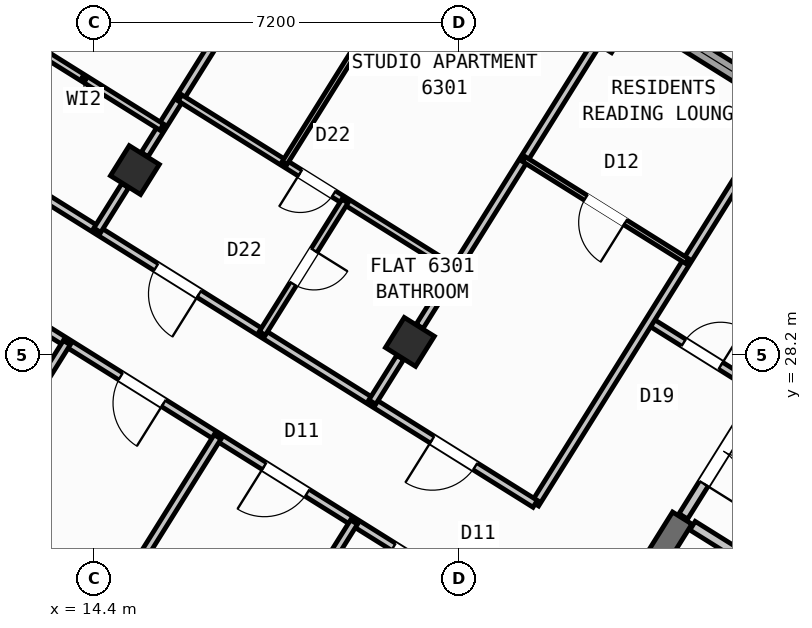
"""IFC4 building model, lengths in metres.
Left out: names, types, materials, properties, quantities, classifications, styles, units other than length and angle.
Written with IfcOpenShell. Run it as: python <this file> out.ifc"""

import sys

from ifc_helpers import new_model, si_unit, direction, frame, frame_2d, origin, origin_2d, place, context, subcontext, project, spatial, rectangle, hollow_rectangle, extrude, source, transform, mapped, element, fill, save


model = new_model("IFC4")
c1 = context("Model", 3, precision=1e-05, world=origin(), true_north=direction((0.0, 1.0)))
c2 = subcontext(c1, "Body", "Model", "MODEL_VIEW")
j1 = project(units=[si_unit("LENGTHUNIT", "METRE"), si_unit("PLANEANGLEUNIT", "RADIAN")], contexts=[c1])
p1 = place(None, origin())
s1 = spatial("IfcSite", under=j1, at=p1, CompositionType="ELEMENT")
p2 = place(p1, origin())
s2 = spatial("IfcBuilding", under=s1, at=p2, CompositionType="ELEMENT")
p3 = place(p2, frame((0.0, 0.0, 251.1)))
s3 = spatial("IfcBuildingStorey", under=s2, at=p3, CompositionType="ELEMENT", Elevation=251.1)
p4 = place(p3, frame((26.007, 24.976, 0.0), z_axis=(0.0, 0.0, 1.0), x_axis=(-0.529931155655, -0.848040665456, 0.0)))
e1 = element("IfcWall", 1, at=p4, inside=s3, PredefinedType="SHEAR", context=c2, shape_type="SweptSolid", body=[
    extrude(rectangle(XDim=6.475, YDim=0.45, at=frame_2d((3.238, 0.0))), origin(), (0.0, 0.0, 1.0), 3.32),
])
m1 = source(origin(), c2, "Body", "SweptSolid", [
    extrude(hollow_rectangle(XDim=0.7, YDim=0.7, WallThickness=0.028, at=origin_2d()), origin(), (0.0, 0.0, 1.0), 3.6),
])
for number, where, z_axis, x_axis in (
    (2, (24.5, 34.643, 0.0), (0.0, 0.0, 1.0), (-0.848, 0.53, 0.0)),
    (3, (20.632, 28.452, 0.0), (0.0, 0.0, 1.0), (-0.848, 0.53, 0.0)),
    (4, (15.205, 31.844, 0.0), (0.0, 0.0, 1.0), (-0.848, 0.53, 0.0)),
):
    element("IfcColumn", number, at=place(p3, frame(where, z_axis=z_axis, x_axis=x_axis)), inside=s3, PredefinedType="COLUMN", context=c2, shape_type="MappedRepresentation", body=[
        mapped(m1, transform((0.0, 0.0, 0.0), scale=1.0)),
    ])
p5 = place(p3, frame((2.415, 23.452, 0.0), z_axis=(0.0, 0.0, 1.0), x_axis=(0.52991049553, 0.848053575387, 0.0)))
e5 = element("IfcWall", 5, at=p5, inside=s3, PredefinedType="STANDARD", context=c2, shape_type="SweptSolid", body=[
    extrude(rectangle(XDim=21.587, YDim=0.32, at=frame_2d((10.794, 0.0))), origin(), (0.0, 0.0, 1.0), 2.845),
])
p6 = place(p5, frame((3.119, 0.0, 0.9)))
e6 = element("IfcOpeningElement", 6, at=p6, cuts=e5, PredefinedType="OPENING", context=c2, shape_type="SweptSolid", body=[
    extrude(rectangle(XDim=1.65, YDim=1.45, at=frame_2d((0.825, 0.725))), frame((0.0, 0.17, 0.0), z_axis=(0.0, -1.0, 0.0), x_axis=(1.0, 0.0, 0.0)), (0.0, 0.0, 1.0), 0.34),
])
p7 = place(p5, frame((7.854, 0.0, 0.9)))
e7 = element("IfcOpeningElement", 7, at=p7, cuts=e5, PredefinedType="OPENING", context=c2, shape_type="SweptSolid", body=[
    extrude(rectangle(XDim=1.35, YDim=1.45, at=frame_2d((0.675, 0.725))), frame((0.0, 0.17, 0.0), z_axis=(0.0, -1.0, 0.0), x_axis=(1.0, 0.0, 0.0)), (0.0, 0.0, 1.0), 0.34),
])
p8 = place(p5, frame((16.979, 0.0, 0.95)))
e8 = element("IfcOpeningElement", 8, at=p8, cuts=e5, PredefinedType="OPENING", context=c2, shape_type="SweptSolid", body=[
    extrude(rectangle(XDim=1.95, YDim=1.35, at=frame_2d((0.975, 0.675))), frame((0.0, 0.17, 0.0), z_axis=(0.0, -1.0, 0.0), x_axis=(1.0, 0.0, 0.0)), (0.0, 0.0, 1.0), 0.34),
])
p9 = place(p3, frame((14.138, 41.825, 0.0), z_axis=(0.0, 0.0, 1.0), x_axis=(0.848046498049, -0.529921821731, 0.0)))
e9 = element("IfcWall", 9, at=p9, inside=s3, PredefinedType="STANDARD", context=c2, shape_type="SweptSolid", body=[
    extrude(rectangle(XDim=31.588, YDim=0.32, at=frame_2d((15.794, 0.0))), origin(), (0.0, 0.0, 1.0), 3.32),
])
p10 = place(p9, frame((3.46, 0.0, 0.0)))
e10 = element("IfcOpeningElement", 10, at=p10, cuts=e9, PredefinedType="OPENING", context=c2, shape_type="SweptSolid", body=[
    extrude(rectangle(XDim=1.05, YDim=2.15, at=frame_2d((0.525, 1.075))), frame((0.0, 0.17, 0.0), z_axis=(0.0, -1.0, 0.0), x_axis=(1.0, 0.0, 0.0)), (0.0, 0.0, 1.0), 0.34),
])
p11 = place(p9, frame((0.831, 0.0, 1.0)))
e11 = element("IfcOpeningElement", 11, at=p11, cuts=e9, PredefinedType="OPENING", context=c2, shape_type="SweptSolid", body=[
    extrude(rectangle(XDim=0.9, YDim=1.25, at=frame_2d((0.45, 0.625))), frame((0.0, 0.17, 0.0), z_axis=(0.0, -1.0, 0.0), x_axis=(1.0, 0.0, 0.0)), (0.0, 0.0, 1.0), 0.34),
])
p12 = place(p9, frame((9.837, 0.0, 0.9)))
e12 = element("IfcOpeningElement", 12, at=p12, cuts=e9, PredefinedType="OPENING", context=c2, shape_type="SweptSolid", body=[
    extrude(rectangle(XDim=1.35, YDim=1.45, at=frame_2d((0.675, 0.725))), frame((0.0, 0.17, 0.0), z_axis=(0.0, -1.0, 0.0), x_axis=(1.0, 0.0, 0.0)), (0.0, 0.0, 1.0), 0.34),
])
p13 = place(p9, frame((13.599, 0.0, 0.95)))
e13 = element("IfcOpeningElement", 13, at=p13, cuts=e9, PredefinedType="OPENING", context=c2, shape_type="SweptSolid", body=[
    extrude(rectangle(XDim=1.95, YDim=1.35, at=frame_2d((0.975, 0.675))), frame((0.0, 0.17, 0.0), z_axis=(0.0, -1.0, 0.0), x_axis=(1.0, 0.0, 0.0)), (0.0, 0.0, 1.0), 0.34),
])
p14 = place(p9, frame((17.154, 0.0, 1.0)))
e14 = element("IfcOpeningElement", 14, at=p14, cuts=e9, PredefinedType="OPENING", context=c2, shape_type="SweptSolid", body=[
    extrude(rectangle(XDim=0.9, YDim=1.25, at=frame_2d((0.45, 0.625))), frame((0.0, 0.17, 0.0), z_axis=(0.0, -1.0, 0.0), x_axis=(1.0, 0.0, 0.0)), (0.0, 0.0, 1.0), 0.34),
])
p15 = place(p9, frame((21.651, 0.0, 0.9)))
e15 = element("IfcOpeningElement", 15, at=p15, cuts=e9, PredefinedType="OPENING", context=c2, shape_type="SweptSolid", body=[
    extrude(rectangle(XDim=1.65, YDim=1.45, at=frame_2d((0.825, 0.725))), frame((0.0, 0.17, 0.0), z_axis=(0.0, -1.0, 0.0), x_axis=(1.0, 0.0, 0.0)), (0.0, 0.0, 1.0), 0.34),
])
p16 = place(p9, frame((27.215, 0.0, 0.9)))
e16 = element("IfcOpeningElement", 16, at=p16, cuts=e9, PredefinedType="OPENING", context=c2, shape_type="SweptSolid", body=[
    extrude(rectangle(XDim=1.65, YDim=1.45, at=frame_2d((0.825, 0.725))), frame((0.0, 0.17, 0.0), z_axis=(0.0, -1.0, 0.0), x_axis=(1.0, 0.0, 0.0)), (0.0, 0.0, 1.0), 0.34),
])
p17 = place(p3, frame((31.525, 21.504, 0.0), z_axis=(0.0, 0.0, 1.0), x_axis=(-0.848042066329, 0.529928913853, 0.0)))
e17 = element("IfcWall", 17, at=p17, inside=s3, PredefinedType="STANDARD", context=c2, shape_type="SweptSolid", body=[
    extrude(rectangle(XDim=6.268, YDim=0.2, at=frame_2d((3.134, 0.0))), origin(), (0.0, 0.0, 1.0), 3.31),
])
p18 = place(p17, frame((4.4, 0.0, 0.0)))
e18 = element("IfcOpeningElement", 18, at=p18, cuts=e17, PredefinedType="OPENING", context=c2, shape_type="SweptSolid", body=[
    extrude(rectangle(XDim=0.86, YDim=2.05, at=frame_2d((0.43, 1.025))), frame((0.0, 0.11, 0.0), z_axis=(0.0, -1.0, 0.0), x_axis=(1.0, 0.0, 0.0)), (0.0, 0.0, 1.0), 0.22),
])
p19 = place(p17, frame((1.45, 0.0, 0.0)))
e19 = element("IfcOpeningElement", 19, at=p19, cuts=e17, PredefinedType="OPENING", context=c2, shape_type="SweptSolid", body=[
    extrude(rectangle(XDim=0.86, YDim=2.05, at=frame_2d((0.43, 1.025))), frame((0.0, 0.11, 0.0), z_axis=(0.0, -1.0, 0.0), x_axis=(1.0, 0.0, 0.0)), (0.0, 0.0, 1.0), 0.22),
])
p20 = place(p3, frame((27.596, 27.52, 0.0), z_axis=(0.0, 0.0, 1.0), x_axis=(-0.529865479138, -0.848081702443, 0.0)))
e20 = element("IfcWall", 20, at=p20, inside=s3, PredefinedType="STANDARD", context=c2, shape_type="SweptSolid", body=[
    extrude(rectangle(XDim=2.96, YDim=0.2, at=frame_2d((1.48, 0.0))), origin(), (0.0, 0.0, 1.0), 3.31),
])
p21 = place(p20, frame((0.7, 0.0, 0.0)))
e21 = element("IfcOpeningElement", 21, at=p21, cuts=e20, PredefinedType="OPENING", context=c2, shape_type="SweptSolid", body=[
    extrude(rectangle(XDim=1.5, YDim=2.15, at=frame_2d((0.75, 1.075))), frame((0.0, 0.11, 0.0), z_axis=(0.0, -1.0, 0.0), x_axis=(1.0, 0.0, 0.0)), (0.0, 0.0, 1.0), 0.22),
])
p22 = place(p3, frame((27.57, 27.478, 0.0), z_axis=(0.0, 0.0, 1.0), x_axis=(-0.848050851465, 0.529914854792, 0.0)))
e22 = element("IfcWall", 22, at=p22, inside=s3, PredefinedType="PARTITIONING", context=c2, shape_type="SweptSolid", body=[
    extrude(rectangle(XDim=2.61, YDim=0.16, at=frame_2d((1.305, 0.0))), origin(), (0.0, 0.0, 1.0), 3.31),
])
p23 = place(p22, frame((0.95, 0.0, 0.0)))
e23 = element("IfcOpeningElement", 23, at=p23, cuts=e22, PredefinedType="OPENING", context=c2, shape_type="SweptSolid", body=[
    extrude(rectangle(XDim=0.86, YDim=2.05, at=frame_2d((0.43, 1.025))), frame((0.0, 0.09, 0.0), z_axis=(0.0, -1.0, 0.0), x_axis=(1.0, 0.0, 0.0)), (0.0, 0.0, 1.0), 0.18),
])
p24 = place(p3, frame((27.953, 33.016, 0.0), z_axis=(0.0, 0.0, 1.0), x_axis=(-0.529903001606, -0.848058257957, 0.0)))
e24 = element("IfcWall", 24, at=p24, inside=s3, PredefinedType="PARTITIONING", context=c2, shape_type="SweptSolid", body=[
    extrude(rectangle(XDim=9.15, YDim=0.16, at=frame_2d((4.575, 0.0))), origin(), (0.0, 0.0, 1.0), 3.31),
])
p25 = place(p3, frame((23.104, 25.256, 0.0), z_axis=(0.0, 0.0, 1.0), x_axis=(-0.848041752158, 0.529929416617, 0.0)))
e25 = element("IfcWall", 25, at=p25, inside=s3, PredefinedType="PARTITIONING", context=c2, shape_type="SweptSolid", body=[
    extrude(rectangle(XDim=16.73, YDim=0.16, at=frame_2d((8.365, 0.0))), origin(), (0.0, 0.0, 1.0), 3.31),
])
p26 = place(p25, frame((1.395, 0.0, 0.0)))
e26 = element("IfcOpeningElement", 26, at=p26, cuts=e25, PredefinedType="OPENING", context=c2, shape_type="SweptSolid", body=[
    extrude(rectangle(XDim=1.0, YDim=2.1, at=frame_2d((0.5, 1.05))), frame((0.0, 0.09, 0.0), z_axis=(0.0, -1.0, 0.0), x_axis=(1.0, 0.0, 0.0)), (0.0, 0.0, 1.0), 0.18),
])
p27 = place(p25, frame((7.82, 0.0, 0.0)))
e27 = element("IfcOpeningElement", 27, at=p27, cuts=e25, PredefinedType="OPENING", context=c2, shape_type="SweptSolid", body=[
    extrude(rectangle(XDim=1.0, YDim=2.1, at=frame_2d((0.5, 1.05))), frame((0.0, 0.09, 0.0), z_axis=(0.0, -1.0, 0.0), x_axis=(1.0, 0.0, 0.0)), (0.0, 0.0, 1.0), 0.18),
])
p28 = place(p25, frame((14.76, 0.0, 0.0)))
e28 = element("IfcOpeningElement", 28, at=p28, cuts=e25, PredefinedType="OPENING", context=c2, shape_type="SweptSolid", body=[
    extrude(rectangle(XDim=1.0, YDim=2.1, at=frame_2d((0.5, 1.05))), frame((0.0, 0.09, 0.0), z_axis=(0.0, -1.0, 0.0), x_axis=(1.0, 0.0, 0.0)), (0.0, 0.0, 1.0), 0.18),
])
p29 = place(p3, frame((21.938, 23.391, 0.0), z_axis=(0.0, 0.0, 1.0), x_axis=(-0.848045850158, 0.529922858565, 0.0)))
e29 = element("IfcWall", 29, at=p29, inside=s3, PredefinedType="PARTITIONING", context=c2, shape_type="SweptSolid", body=[
    extrude(rectangle(XDim=16.73, YDim=0.16, at=frame_2d((8.365, 0.0))), origin(), (0.0, 0.0, 1.0), 3.31),
])
p30 = place(p29, frame((0.92, 0.0, 0.0)))
e30 = element("IfcOpeningElement", 30, at=p30, cuts=e29, PredefinedType="OPENING", context=c2, shape_type="SweptSolid", body=[
    extrude(rectangle(XDim=1.0, YDim=2.1, at=frame_2d((0.5, 1.05))), frame((0.0, 0.09, 0.0), z_axis=(0.0, -1.0, 0.0), x_axis=(1.0, 0.0, 0.0)), (0.0, 0.0, 1.0), 0.18),
])
p31 = place(p29, frame((3.928, 0.0, 0.0)))
e31 = element("IfcOpeningElement", 31, at=p31, cuts=e29, PredefinedType="OPENING", context=c2, shape_type="SweptSolid", body=[
    extrude(rectangle(XDim=1.0, YDim=2.1, at=frame_2d((0.5, 1.05))), frame((0.0, 0.09, 0.0), z_axis=(0.0, -1.0, 0.0), x_axis=(1.0, 0.0, 0.0)), (0.0, 0.0, 1.0), 0.18),
])
p32 = place(p29, frame((7.271, 0.0, 0.0)))
e32 = element("IfcOpeningElement", 32, at=p32, cuts=e29, PredefinedType="OPENING", context=c2, shape_type="SweptSolid", body=[
    extrude(rectangle(XDim=1.0, YDim=2.1, at=frame_2d((0.5, 1.05))), frame((0.0, 0.09, 0.0), z_axis=(0.0, -1.0, 0.0), x_axis=(1.0, 0.0, 0.0)), (0.0, 0.0, 1.0), 0.18),
])
p33 = place(p29, frame((10.78, 0.0, 0.0)))
e33 = element("IfcOpeningElement", 33, at=p33, cuts=e29, PredefinedType="OPENING", context=c2, shape_type="SweptSolid", body=[
    extrude(rectangle(XDim=1.0, YDim=2.1, at=frame_2d((0.5, 1.05))), frame((0.0, 0.09, 0.0), z_axis=(0.0, -1.0, 0.0), x_axis=(1.0, 0.0, 0.0)), (0.0, 0.0, 1.0), 0.18),
])
p34 = place(p29, frame((14.372, 0.0, 0.0)))
e34 = element("IfcOpeningElement", 34, at=p34, cuts=e29, PredefinedType="OPENING", context=c2, shape_type="SweptSolid", body=[
    extrude(rectangle(XDim=1.0, YDim=2.1, at=frame_2d((0.5, 1.05))), frame((0.0, 0.09, 0.0), z_axis=(0.0, -1.0, 0.0), x_axis=(1.0, 0.0, 0.0)), (0.0, 0.0, 1.0), 0.18),
])
p35 = place(p3, frame((19.529, 24.896, 0.0), z_axis=(0.0, 0.0, 1.0), x_axis=(-0.529914125013, -0.848051307476, 0.0)))
e35 = element("IfcWall", 35, at=p35, inside=s3, PredefinedType="PARTITIONING", context=c2, shape_type="SweptSolid", body=[
    extrude(rectangle(XDim=10.35, YDim=0.16, at=frame_2d((5.175, 0.0))), origin(), (0.0, 0.0, 1.0), 3.31),
])
p36 = place(p3, frame((16.837, 26.579, 0.0), z_axis=(0.0, 0.0, 1.0), x_axis=(-0.529941690036, -0.848034082547, 0.0)))
e36 = element("IfcWall", 36, at=p36, inside=s3, PredefinedType="PARTITIONING", context=c2, shape_type="SweptSolid", body=[
    extrude(rectangle(XDim=10.35, YDim=0.16, at=frame_2d((5.175, 0.0))), origin(), (0.0, 0.0, 1.0), 2.935),
])
p37 = place(p3, frame((13.861, 28.438, 0.0), z_axis=(0.0, 0.0, 1.0), x_axis=(-0.529931089283, -0.848040706931, 0.0)))
e37 = element("IfcWall", 37, at=p37, inside=s3, PredefinedType="PARTITIONING", context=c2, shape_type="SweptSolid", body=[
    extrude(rectangle(XDim=10.35, YDim=0.16, at=frame_2d((5.175, 0.0))), origin(), (0.0, 0.0, 1.0), 3.31),
])
p38 = place(p3, frame((24.309, 34.336, 0.0), z_axis=(0.0, 0.0, 1.0), x_axis=(-0.529895484599, -0.848062954858, 0.0)))
e38 = element("IfcWall", 38, at=p38, inside=s3, PredefinedType="PARTITIONING", context=c2, shape_type="SweptSolid", body=[
    extrude(rectangle(XDim=6.576, YDim=0.16, at=frame_2d((3.288, 0.0))), origin(), (0.0, 0.0, 1.0), 2.845),
])
p39 = place(p3, frame((20.44, 28.145, 0.0), z_axis=(0.0, 0.0, 1.0), x_axis=(-0.529977795385, -0.848011519025, 0.0)))
e39 = element("IfcWall", 39, at=p39, inside=s3, PredefinedType="PARTITIONING", context=c2, shape_type="SweptSolid", body=[
    extrude(rectangle(XDim=1.038, YDim=0.16, at=frame_2d((0.519, 0.0))), origin(), (0.0, 0.0, 1.0), 2.845),
])
p40 = place(p3, frame((26.099, 30.05, 0.0), z_axis=(0.0, 0.0, 1.0), x_axis=(-0.84803087207, 0.529946827537, 0.0)))
e40 = element("IfcWall", 40, at=p40, inside=s3, PredefinedType="PARTITIONING", context=c2, shape_type="SweptSolid", body=[
    extrude(rectangle(XDim=3.79, YDim=0.11, at=frame_2d((1.895, 0.0))), origin(), (0.0, 0.0, 1.0), 3.31),
])
p41 = place(p40, frame((1.435, 0.0, 0.0)))
e41 = element("IfcOpeningElement", 41, at=p41, cuts=e40, PredefinedType="OPENING", context=c2, shape_type="SweptSolid", body=[
    extrude(rectangle(XDim=0.92, YDim=2.08, at=frame_2d((0.46, 1.04))), frame((0.0, 0.065, 0.0), z_axis=(0.0, -1.0, 0.0), x_axis=(1.0, 0.0, 0.0)), (0.0, 0.0, 1.0), 0.13),
])
p42 = place(p3, frame((18.881, 37.727, 0.0), z_axis=(0.0, 0.0, 1.0), x_axis=(-0.529938869374, -0.84803584519, 0.0)))
e42 = element("IfcWall", 42, at=p42, inside=s3, PredefinedType="PARTITIONING", context=c2, shape_type="SweptSolid", body=[
    extrude(rectangle(XDim=6.576, YDim=0.16, at=frame_2d((3.288, 0.0))), origin(), (0.0, 0.0, 1.0), 2.845),
])
p43 = place(p3, frame((15.013, 31.537, 0.0), z_axis=(0.0, 0.0, 1.0), x_axis=(-0.529872092657, -0.848077570405, 0.0)))
e43 = element("IfcWall", 43, at=p43, inside=s3, PredefinedType="PARTITIONING", context=c2, shape_type="SweptSolid", body=[
    extrude(rectangle(XDim=1.038, YDim=0.16, at=frame_2d((0.519, 0.0))), origin(), (0.0, 0.0, 1.0), 2.845),
])
p44 = place(p3, frame((21.522, 29.877, 0.0), z_axis=(0.0, 0.0, 1.0), x_axis=(-0.848039019877, 0.529933789039, 0.0)))
e44 = element("IfcWall", 44, at=p44, inside=s3, PredefinedType="PLUMBINGWALL", context=c2, shape_type="SweptSolid", body=[
    extrude(rectangle(XDim=6.4, YDim=0.14, at=frame_2d((3.2, 0.0))), origin(), (0.0, 0.0, 1.0), 3.31),
])
p45 = place(p44, frame((2.824, 0.0, 0.0)))
e45 = element("IfcOpeningElement", 45, at=p45, cuts=e44, PredefinedType="OPENING", context=c2, shape_type="SweptSolid", body=[
    extrude(rectangle(XDim=0.78, YDim=2.05, at=frame_2d((0.39, 1.025))), frame((0.0, 0.08, 0.0), z_axis=(0.0, -1.0, 0.0), x_axis=(1.0, 0.0, 0.0)), (0.0, 0.0, 1.0), 0.16),
])
p46 = place(p3, frame((19.351, 31.233, 0.0), z_axis=(0.0, 0.0, 1.0), x_axis=(-0.52989206052, -0.848065094316, 0.0)))
e46 = element("IfcWall", 46, at=p46, inside=s3, PredefinedType="PLUMBINGWALL", context=c2, shape_type="SweptSolid", body=[
    extrude(rectangle(XDim=3.08, YDim=0.14, at=frame_2d((1.54, 0.0))), origin(), (0.0, 0.0, 1.0), 3.31),
])
p47 = place(p46, frame((1.15, 0.0, 0.0)))
e47 = element("IfcOpeningElement", 47, at=p47, cuts=e46, PredefinedType="OPENING", context=c2, shape_type="SweptSolid", body=[
    extrude(rectangle(XDim=0.78, YDim=2.05, at=frame_2d((0.39, 1.025))), frame((0.0, 0.08, 0.0), z_axis=(0.0, -1.0, 0.0), x_axis=(1.0, 0.0, 0.0)), (0.0, 0.0, 1.0), 0.16),
])
p48 = place(p3, frame((21.517, 37.356, 0.0), z_axis=(0.0, 0.0, 1.0), x_axis=(-0.529905479715, -0.848056709524, 0.0)))
e48 = element("IfcWall", 48, at=p48, inside=s3, PredefinedType="PARTITIONING", context=c2, shape_type="SweptSolid", body=[
    extrude(rectangle(XDim=6.34, YDim=0.11, at=frame_2d((3.17, 0.0))), origin(), (0.0, 0.0, 1.0), 3.31),
])
p49 = place(p48, frame((0.47, 0.0, 0.0)))
e49 = element("IfcOpeningElement", 49, at=p49, cuts=e48, PredefinedType="OPENING", context=c2, shape_type="SweptSolid", body=[
    extrude(rectangle(XDim=0.92, YDim=2.08, at=frame_2d((0.46, 1.04))), frame((0.0, 0.065, 0.0), z_axis=(0.0, -1.0, 0.0), x_axis=(1.0, 0.0, 0.0)), (0.0, 0.0, 1.0), 0.13),
])
p50 = place(p3, frame((16.385, 40.563, 0.0), z_axis=(0.0, 0.0, 1.0), x_axis=(-0.529931378574, -0.848040526156, 0.0)))
e50 = element("IfcWall", 50, at=p50, inside=s3, PredefinedType="PARTITIONING", context=c2, shape_type="SweptSolid", body=[
    extrude(rectangle(XDim=9.42, YDim=0.11, at=frame_2d((4.71, 0.0))), origin(), (0.0, 0.0, 1.0), 3.31),
])
p51 = place(p50, frame((7.78, 0.0, 0.0)))
e51 = element("IfcOpeningElement", 51, at=p51, cuts=e50, PredefinedType="OPENING", context=c2, shape_type="SweptSolid", body=[
    extrude(rectangle(XDim=0.78, YDim=2.05, at=frame_2d((0.39, 1.025))), frame((0.0, 0.065, 0.0), z_axis=(0.0, -1.0, 0.0), x_axis=(1.0, 0.0, 0.0)), (0.0, 0.0, 1.0), 0.13),
])
p52 = place(p50, frame((3.05, 0.0, 0.0)))
e52 = element("IfcOpeningElement", 52, at=p52, cuts=e50, PredefinedType="OPENING", context=c2, shape_type="SweptSolid", body=[
    extrude(rectangle(XDim=0.92, YDim=2.08, at=frame_2d((0.46, 1.04))), frame((0.0, 0.065, 0.0), z_axis=(0.0, -1.0, 0.0), x_axis=(1.0, 0.0, 0.0)), (0.0, 0.0, 1.0), 0.13),
])
p53 = place(p3, frame((15.734, 32.692, 0.0), z_axis=(0.0, 0.0, 1.0), x_axis=(-0.848051346257, 0.52991406295, 0.0)))
e53 = element("IfcWall", 53, at=p53, inside=s3, PredefinedType="PLUMBINGWALL", context=c2, shape_type="SweptSolid", body=[
    extrude(rectangle(XDim=3.62, YDim=0.14, at=frame_2d((1.81, 0.0))), origin(), (0.0, 0.0, 1.0), 3.31),
])
m2 = source(origin(), c2, "Body", "SweptSolid", [
    extrude(rectangle(XDim=1.95, YDim=1.35, at=frame_2d((0.975, 0.675))), frame((0.0, 0.03, 0.0), z_axis=(0.0, -1.0, 0.0), x_axis=(1.0, 0.0, 0.0)), (0.0, 0.0, 1.0), 0.06),
])
p54 = place(p13, origin())
e54 = element("IfcWindow", 54, at=p54, inside=s3, PartitioningType="SINGLE_PANEL", PredefinedType="WINDOW", context=c2, shape_type="MappedRepresentation", body=[
    mapped(m2, transform((0.0, 0.0, 0.0), scale=1.0)),
])
fill(e13, e54)
m3 = source(origin(), c2, "Body", "SweptSolid", [
    extrude(rectangle(XDim=0.86, YDim=2.05, at=frame_2d((0.43, 1.025))), frame((0.0, 0.025, 0.0), z_axis=(0.0, -1.0, 0.0), x_axis=(1.0, 0.0, 0.0)), (0.0, 0.0, 1.0), 0.05),
])
p55 = place(p23, frame((0.86, 0.0, 0.0), z_axis=(0.0, 0.0, 1.0), x_axis=(-1.0, 0.0, 0.0)))
e55 = element("IfcDoor", 55, at=p55, inside=s3, OperationType="SINGLE_SWING_RIGHT", PredefinedType="DOOR", context=c2, shape_type="MappedRepresentation", body=[
    mapped(m3, transform((0.0, 0.0, 0.0), scale=1.0)),
])
fill(e23, e55)
m4 = source(origin(), c2, "Body", "SweptSolid", [
    extrude(rectangle(XDim=1.5, YDim=2.15, at=frame_2d((0.75, 1.075))), frame((0.0, 0.025, 0.0), z_axis=(0.0, -1.0, 0.0), x_axis=(1.0, 0.0, 0.0)), (0.0, 0.0, 1.0), 0.05),
])
p56 = place(p21, origin())
e56 = element("IfcDoor", 56, at=p56, inside=s3, OperationType="DOUBLE_DOOR_SINGLE_SWING", PredefinedType="DOOR", context=c2, shape_type="MappedRepresentation", body=[
    mapped(m4, transform((0.0, 0.0, 0.0), scale=1.0)),
])
fill(e21, e56)
m5 = source(origin(), c2, "Body", "SweptSolid", [
    extrude(rectangle(XDim=1.0, YDim=2.1, at=frame_2d((0.5, 1.05))), frame((0.0, 0.025, 0.0), z_axis=(0.0, -1.0, 0.0), x_axis=(1.0, 0.0, 0.0)), (0.0, 0.0, 1.0), 0.05),
])
p57 = place(p30, origin())
e57 = element("IfcDoor", 57, at=p57, inside=s3, OperationType="SINGLE_SWING_LEFT", PredefinedType="DOOR", context=c2, shape_type="MappedRepresentation", body=[
    mapped(m5, transform((0.0, 0.0, 0.0), scale=1.0)),
])
fill(e30, e57)
p58 = place(p31, origin())
e58 = element("IfcDoor", 58, at=p58, inside=s3, OperationType="SINGLE_SWING_RIGHT", PredefinedType="DOOR", context=c2, shape_type="MappedRepresentation", body=[
    mapped(m5, transform((0.0, 0.0, 0.0), scale=1.0)),
])
fill(e31, e58)
p59 = place(p32, origin())
e59 = element("IfcDoor", 59, at=p59, inside=s3, OperationType="SINGLE_SWING_LEFT", PredefinedType="DOOR", context=c2, shape_type="MappedRepresentation", body=[
    mapped(m5, transform((0.0, 0.0, 0.0), scale=1.0)),
])
fill(e32, e59)
p60 = place(p26, origin())
e60 = element("IfcDoor", 60, at=p60, inside=s3, OperationType="SINGLE_SWING_RIGHT", PredefinedType="DOOR", context=c2, shape_type="MappedRepresentation", body=[
    mapped(m5, transform((0.0, 0.0, 0.0), scale=1.0)),
])
fill(e26, e60)
m6 = source(origin(), c2, "Body", "SweptSolid", [
    extrude(rectangle(XDim=0.92, YDim=2.08, at=frame_2d((0.46, 1.04))), frame((0.0, 0.025, 0.0), z_axis=(0.0, -1.0, 0.0), x_axis=(1.0, 0.0, 0.0)), (0.0, 0.0, 1.0), 0.05),
])
p61 = place(p41, origin())
e61 = element("IfcDoor", 61, at=p61, inside=s3, OperationType="SINGLE_SWING_LEFT", PredefinedType="DOOR", context=c2, shape_type="MappedRepresentation", body=[
    mapped(m6, transform((0.0, 0.0, 0.0), scale=1.0)),
])
fill(e41, e61)
p62 = place(p27, origin())
e62 = element("IfcDoor", 62, at=p62, inside=s3, OperationType="SINGLE_SWING_LEFT", PredefinedType="DOOR", context=c2, shape_type="MappedRepresentation", body=[
    mapped(m5, transform((0.0, 0.0, 0.0), scale=1.0)),
])
fill(e27, e62)
m7 = source(origin(), c2, "Body", "SweptSolid", [
    extrude(rectangle(XDim=0.78, YDim=2.05, at=frame_2d((0.39, 1.025))), frame((0.0, 0.025, 0.0), z_axis=(0.0, -1.0, 0.0), x_axis=(1.0, 0.0, 0.0)), (0.0, 0.0, 1.0), 0.05),
])
p63 = place(p45, origin())
e63 = element("IfcDoor", 63, at=p63, inside=s3, OperationType="SINGLE_SWING_RIGHT", PredefinedType="DOOR", context=c2, shape_type="MappedRepresentation", body=[
    mapped(m7, transform((0.0, 0.0, 0.0), scale=1.0)),
])
fill(e45, e63)
p64 = place(p47, origin())
e64 = element("IfcDoor", 64, at=p64, inside=s3, OperationType="SINGLE_SWING_LEFT", PredefinedType="DOOR", context=c2, shape_type="MappedRepresentation", body=[
    mapped(m7, transform((0.0, 0.0, 0.0), scale=1.0)),
])
fill(e47, e64)
save(model, sys.argv[1])
